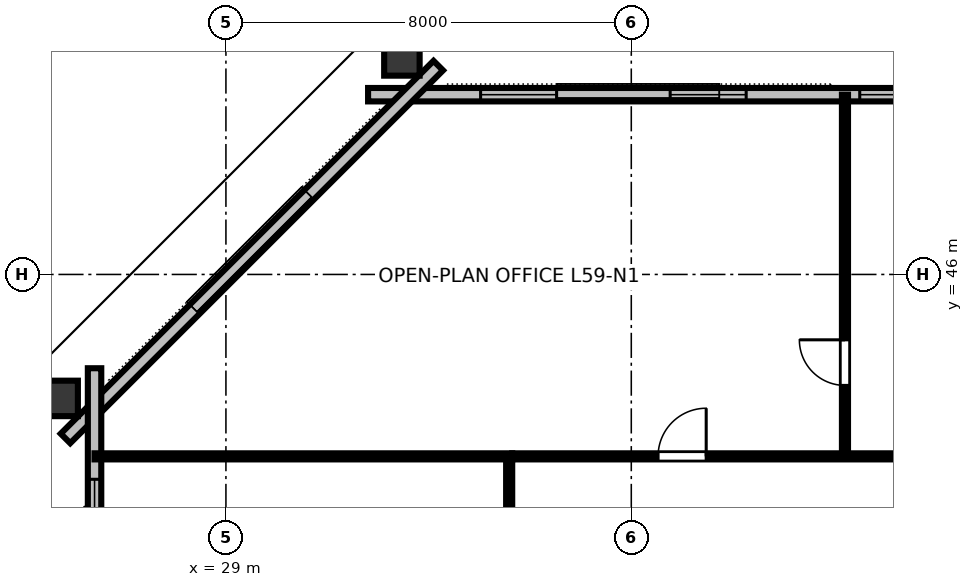
"""IFC4 building model, lengths in metres.
Left out: names, types, materials, properties, quantities, classifications, styles, units other than length and angle.
Written with IfcOpenShell. Run it as: python <this file> out.ifc"""

import sys

from ifc_helpers import new_model, si_unit, direction, frame, frame_2d, origin, origin_2d, place, context, subcontext, project, spatial, rectangle, hollow_rectangle, extrude, element, fill, save


model = new_model("IFC4")
c1 = context("Model", 3, precision=1e-05, world=origin(), true_north=direction((0.0, 1.0)))
c2 = subcontext(c1, "Body", "Model", "MODEL_VIEW")
j1 = project(units=[si_unit("LENGTHUNIT", "METRE"), si_unit("PLANEANGLEUNIT", "RADIAN")], contexts=[c1])
p1 = place(None, origin())
s1 = spatial("IfcSite", under=j1, at=p1, CompositionType="ELEMENT")
p2 = place(p1, origin())
s2 = spatial("IfcBuilding", under=s1, at=p2, CompositionType="ELEMENT")
p3 = place(p2, frame((0.0, 0.0, 223.8)))
s3 = spatial("IfcBuildingStorey", under=s2, at=p3, CompositionType="ELEMENT", Elevation=223.8)
for number, where, z_axis, x_axis in (
    (1, (32.473, 50.348, 0.0), (0.0, 0.0, 1.0), (1.0, 0.0, 0.0)),
    (2, (25.653, 43.554, 0.0), (0.0, 0.0, 1.0), (0.0, 1.0, 0.0)),
):
    element("IfcColumn", number, at=place(p3, frame(where, z_axis=z_axis, x_axis=x_axis)), inside=s3, PredefinedType="COLUMN", context=c2, shape_type="SweptSolid", body=[
        extrude(hollow_rectangle(XDim=0.7, YDim=0.85, WallThickness=0.04, at=origin_2d()), origin(), (0.0, 0.0, 1.0), 3.373),
    ])
p4 = place(p3, frame((60.195, 49.547, 0.0), z_axis=(0.0, 0.0, 1.0), x_axis=(-1.0, 0.0, 0.0)))
e3 = element("IfcWall", 3, at=p4, inside=s3, PredefinedType="STANDARD", context=c2, shape_type="SweptSolid", body=[
    extrude(rectangle(XDim=28.389, YDim=0.265, at=frame_2d((14.195, 0.0))), origin(), (0.0, 0.0, 1.0), 3.375),
])
p5 = place(p4, frame((2.221, 0.0, 0.85)))
e4 = element("IfcOpeningElement", 4, at=p5, cuts=e3, PredefinedType="OPENING", context=c2, shape_type="SweptSolid", body=[
    extrude(rectangle(XDim=1.5, YDim=1.85, at=frame_2d((0.75, 0.925))), frame((0.0, 0.142, 0.0), z_axis=(0.0, -1.0, 0.0), x_axis=(1.0, 0.0, 0.0)), (0.0, 0.0, 1.0), 0.285),
])
p6 = place(p4, frame((5.962, 0.0, 0.85)))
e5 = element("IfcOpeningElement", 5, at=p6, cuts=e3, PredefinedType="OPENING", context=c2, shape_type="SweptSolid", body=[
    extrude(rectangle(XDim=1.5, YDim=1.85, at=frame_2d((0.75, 0.925))), frame((0.0, 0.142, 0.0), z_axis=(0.0, -1.0, 0.0), x_axis=(1.0, 0.0, 0.0)), (0.0, 0.0, 1.0), 0.285),
])
p7 = place(p4, frame((9.703, 0.0, 0.85)))
e6 = element("IfcOpeningElement", 6, at=p7, cuts=e3, PredefinedType="OPENING", context=c2, shape_type="SweptSolid", body=[
    extrude(rectangle(XDim=1.5, YDim=1.85, at=frame_2d((0.75, 0.925))), frame((0.0, 0.142, 0.0), z_axis=(0.0, -1.0, 0.0), x_axis=(1.0, 0.0, 0.0)), (0.0, 0.0, 1.0), 0.285),
])
p8 = place(p4, frame((17.186, 0.0, 0.85)))
e7 = element("IfcOpeningElement", 7, at=p8, cuts=e3, PredefinedType="OPENING", context=c2, shape_type="SweptSolid", body=[
    extrude(rectangle(XDim=1.5, YDim=1.85, at=frame_2d((0.75, 0.925))), frame((0.0, 0.142, 0.0), z_axis=(0.0, -1.0, 0.0), x_axis=(1.0, 0.0, 0.0)), (0.0, 0.0, 1.0), 0.285),
])
p9 = place(p4, frame((20.927, 0.0, 0.85)))
e8 = element("IfcOpeningElement", 8, at=p9, cuts=e3, PredefinedType="OPENING", context=c2, shape_type="SweptSolid", body=[
    extrude(rectangle(XDim=1.5, YDim=1.85, at=frame_2d((0.75, 0.925))), frame((0.0, 0.142, 0.0), z_axis=(0.0, -1.0, 0.0), x_axis=(1.0, 0.0, 0.0)), (0.0, 0.0, 1.0), 0.285),
])
p10 = place(p4, frame((24.668, 0.0, 0.85)))
e9 = element("IfcOpeningElement", 9, at=p10, cuts=e3, PredefinedType="OPENING", context=c2, shape_type="SweptSolid", body=[
    extrude(rectangle(XDim=1.5, YDim=1.85, at=frame_2d((0.75, 0.925))), frame((0.0, 0.142, 0.0), z_axis=(0.0, -1.0, 0.0), x_axis=(1.0, 0.0, 0.0)), (0.0, 0.0, 1.0), 0.285),
])
p11 = place(p3, frame((33.191, 50.121, 0.0), z_axis=(0.0, 0.0, 1.0), x_axis=(-0.707106781187, -0.707106781187, 0.0)))
e10 = element("IfcWall", 10, at=p11, inside=s3, PredefinedType="STANDARD", context=c2, shape_type="SweptSolid", body=[
    extrude(rectangle(XDim=10.405, YDim=0.265, at=frame_2d((5.203, 0.0))), origin(), (0.0, 0.0, 1.0), 3.375),
])
p12 = place(p3, frame((26.407, 44.149, 0.0), z_axis=(0.0, 0.0, 1.0), x_axis=(0.0, -1.0, 0.0)))
e11 = element("IfcWall", 11, at=p12, inside=s3, PredefinedType="STANDARD", context=c2, shape_type="SweptSolid", body=[
    extrude(rectangle(XDim=24.298, YDim=0.265, at=frame_2d((12.149, 0.0))), origin(), (0.0, 0.0, 1.0), 3.375),
])
p13 = place(p12, frame((8.469, 0.0, 0.0)))
e12 = element("IfcOpeningElement", 12, at=p13, cuts=e11, PredefinedType="OPENING", context=c2, shape_type="SweptSolid", body=[
    extrude(rectangle(XDim=1.4, YDim=2.15, at=frame_2d((0.7, 1.075))), frame((0.0, 0.142, 0.0), z_axis=(0.0, -1.0, 0.0), x_axis=(1.0, 0.0, 0.0)), (0.0, 0.0, 1.0), 0.285),
])
p14 = place(p12, frame((2.191, 0.0, 0.85)))
e13 = element("IfcOpeningElement", 13, at=p14, cuts=e11, PredefinedType="OPENING", context=c2, shape_type="SweptSolid", body=[
    extrude(rectangle(XDim=1.5, YDim=1.85, at=frame_2d((0.75, 0.925))), frame((0.0, 0.142, 0.0), z_axis=(0.0, -1.0, 0.0), x_axis=(1.0, 0.0, 0.0)), (0.0, 0.0, 1.0), 0.285),
])
p15 = place(p12, frame((5.875, 0.0, 0.85)))
e14 = element("IfcOpeningElement", 14, at=p15, cuts=e11, PredefinedType="OPENING", context=c2, shape_type="SweptSolid", body=[
    extrude(rectangle(XDim=1.5, YDim=1.85, at=frame_2d((0.75, 0.925))), frame((0.0, 0.142, 0.0), z_axis=(0.0, -1.0, 0.0), x_axis=(1.0, 0.0, 0.0)), (0.0, 0.0, 1.0), 0.285),
])
p16 = place(p12, frame((13.24, 0.0, 0.85)))
e15 = element("IfcOpeningElement", 15, at=p16, cuts=e11, PredefinedType="OPENING", context=c2, shape_type="SweptSolid", body=[
    extrude(rectangle(XDim=1.5, YDim=1.85, at=frame_2d((0.75, 0.925))), frame((0.0, 0.142, 0.0), z_axis=(0.0, -1.0, 0.0), x_axis=(1.0, 0.0, 0.0)), (0.0, 0.0, 1.0), 0.285),
])
p17 = place(p12, frame((16.924, 0.0, 0.85)))
e16 = element("IfcOpeningElement", 16, at=p17, cuts=e11, PredefinedType="OPENING", context=c2, shape_type="SweptSolid", body=[
    extrude(rectangle(XDim=1.5, YDim=1.85, at=frame_2d((0.75, 0.925))), frame((0.0, 0.142, 0.0), z_axis=(0.0, -1.0, 0.0), x_axis=(1.0, 0.0, 0.0)), (0.0, 0.0, 1.0), 0.285),
])
p18 = place(p12, frame((20.607, 0.0, 0.85)))
e17 = element("IfcOpeningElement", 17, at=p18, cuts=e11, PredefinedType="OPENING", context=c2, shape_type="SweptSolid", body=[
    extrude(rectangle(XDim=1.5, YDim=1.85, at=frame_2d((0.75, 0.925))), frame((0.0, 0.142, 0.0), z_axis=(0.0, -1.0, 0.0), x_axis=(1.0, 0.0, 0.0)), (0.0, 0.0, 1.0), 0.285),
])
p19 = place(p3, frame((41.217, 42.41, 0.0), z_axis=(0.0, 0.0, 1.0), x_axis=(0.0, 1.0, 0.0)))
e18 = element("IfcWall", 18, at=p19, inside=s3, PredefinedType="PARTITIONING", context=c2, shape_type="SweptSolid", body=[
    extrude(rectangle(XDim=7.137, YDim=0.12, at=frame_2d((3.569, 0.0))), origin(), (0.0, 0.0, 1.0), 2.655),
])
p20 = place(p19, frame((1.4, 0.0, 0.0)))
e19 = element("IfcOpeningElement", 19, at=p20, cuts=e18, PredefinedType="OPENING", context=c2, shape_type="SweptSolid", body=[
    extrude(rectangle(XDim=0.9, YDim=2.15, at=frame_2d((0.45, 1.075))), frame((0.0, 0.07, 0.0), z_axis=(0.0, -1.0, 0.0), x_axis=(1.0, 0.0, 0.0)), (0.0, 0.0, 1.0), 0.14),
])
p21 = place(p3, frame((34.65, 42.41, 0.0), z_axis=(0.0, 0.0, 1.0), x_axis=(1.0, 0.0, 0.0)))
e20 = element("IfcWall", 20, at=p21, inside=s3, PredefinedType="PARTITIONING", context=c2, shape_type="SweptSolid", body=[
    extrude(rectangle(XDim=10.33, YDim=0.12, at=frame_2d((5.165, 0.0))), origin(), (0.0, 0.0, 1.0), 2.655),
])
p22 = place(p21, frame((2.878, 0.0, 0.0)))
e21 = element("IfcOpeningElement", 21, at=p22, cuts=e20, PredefinedType="OPENING", context=c2, shape_type="SweptSolid", body=[
    extrude(rectangle(XDim=0.95, YDim=2.15, at=frame_2d((0.475, 1.075))), frame((0.0, 0.07, 0.0), z_axis=(0.0, -1.0, 0.0), x_axis=(1.0, 0.0, 0.0)), (0.0, 0.0, 1.0), 0.14),
])
p23 = place(p21, frame((7.974, 0.0, 0.0)))
e22 = element("IfcOpeningElement", 22, at=p23, cuts=e20, PredefinedType="OPENING", context=c2, shape_type="SweptSolid", body=[
    extrude(rectangle(XDim=0.95, YDim=2.15, at=frame_2d((0.475, 1.075))), frame((0.0, 0.07, 0.0), z_axis=(0.0, -1.0, 0.0), x_axis=(1.0, 0.0, 0.0)), (0.0, 0.0, 1.0), 0.14),
])
p24 = place(p3, frame((34.59, 21.65, 0.0), z_axis=(0.0, 0.0, 1.0), x_axis=(0.0, 1.0, 0.0)))
e23 = element("IfcWall", 23, at=p24, inside=s3, PredefinedType="PARTITIONING", context=c2, shape_type="SweptSolid", body=[
    extrude(rectangle(XDim=20.7, YDim=0.12, at=frame_2d((10.35, 0.0))), origin(), (0.0, 0.0, 1.0), 2.655),
])
p25 = place(p24, frame((5.449, 0.0, 0.0)))
e24 = element("IfcOpeningElement", 24, at=p25, cuts=e23, PredefinedType="OPENING", context=c2, shape_type="SweptSolid", body=[
    extrude(rectangle(XDim=0.95, YDim=2.15, at=frame_2d((0.475, 1.075))), frame((0.0, 0.07, 0.0), z_axis=(0.0, -1.0, 0.0), x_axis=(1.0, 0.0, 0.0)), (0.0, 0.0, 1.0), 0.14),
])
p26 = place(p24, frame((15.599, 0.0, 0.0)))
e25 = element("IfcOpeningElement", 25, at=p26, cuts=e23, PredefinedType="OPENING", context=c2, shape_type="SweptSolid", body=[
    extrude(rectangle(XDim=0.95, YDim=2.15, at=frame_2d((0.475, 1.075))), frame((0.0, 0.07, 0.0), z_axis=(0.0, -1.0, 0.0), x_axis=(1.0, 0.0, 0.0)), (0.0, 0.0, 1.0), 0.14),
])
p27 = place(p3, frame((34.65, 42.41, 0.0), z_axis=(0.0, 0.0, 1.0), x_axis=(-1.0, 0.0, 0.0)))
e26 = element("IfcWall", 26, at=p27, inside=s3, PredefinedType="PARTITIONING", context=c2, shape_type="SweptSolid", body=[
    extrude(rectangle(XDim=8.243, YDim=0.12, at=frame_2d((4.121, 0.0))), origin(), (0.0, 0.0, 1.0), 2.655),
])
p28 = place(p8, origin())
e27 = element("IfcWindow", 27, at=p28, inside=s3, PartitioningType="SINGLE_PANEL", PredefinedType="WINDOW", context=c2, shape_type="SweptSolid", body=[
    extrude(rectangle(XDim=1.5, YDim=1.85, at=frame_2d((0.75, 0.925))), frame((0.0, 0.03, 0.0), z_axis=(0.0, -1.0, 0.0), x_axis=(1.0, 0.0, 0.0)), (0.0, 0.0, 1.0), 0.06),
])
fill(e7, e27)
p29 = place(p9, origin())
e28 = element("IfcWindow", 28, at=p29, inside=s3, PartitioningType="SINGLE_PANEL", PredefinedType="WINDOW", context=c2, shape_type="SweptSolid", body=[
    extrude(rectangle(XDim=1.5, YDim=1.85, at=frame_2d((0.75, 0.925))), frame((0.0, 0.03, 0.0), z_axis=(0.0, -1.0, 0.0), x_axis=(1.0, 0.0, 0.0)), (0.0, 0.0, 1.0), 0.06),
])
fill(e8, e28)
p30 = place(p10, origin())
e29 = element("IfcWindow", 29, at=p30, inside=s3, PartitioningType="SINGLE_PANEL", PredefinedType="WINDOW", context=c2, shape_type="SweptSolid", body=[
    extrude(rectangle(XDim=1.5, YDim=1.85, at=frame_2d((0.75, 0.925))), frame((0.0, 0.03, 0.0), z_axis=(0.0, -1.0, 0.0), x_axis=(1.0, 0.0, 0.0)), (0.0, 0.0, 1.0), 0.06),
])
fill(e9, e29)
p31 = place(p14, origin())
e30 = element("IfcWindow", 30, at=p31, inside=s3, PartitioningType="SINGLE_PANEL", PredefinedType="WINDOW", context=c2, shape_type="SweptSolid", body=[
    extrude(rectangle(XDim=1.5, YDim=1.85, at=frame_2d((0.75, 0.925))), frame((0.0, 0.03, 0.0), z_axis=(0.0, -1.0, 0.0), x_axis=(1.0, 0.0, 0.0)), (0.0, 0.0, 1.0), 0.06),
])
fill(e13, e30)
p32 = place(p20, origin())
e31 = element("IfcDoor", 31, at=p32, inside=s3, OperationType="SINGLE_SWING_RIGHT", PredefinedType="DOOR", context=c2, shape_type="SweptSolid", body=[
    extrude(rectangle(XDim=0.9, YDim=2.15, at=frame_2d((0.45, 1.075))), frame((0.0, 0.025, 0.0), z_axis=(0.0, -1.0, 0.0), x_axis=(1.0, 0.0, 0.0)), (0.0, 0.0, 1.0), 0.05),
])
fill(e19, e31)
p33 = place(p22, origin())
e32 = element("IfcDoor", 32, at=p33, inside=s3, OperationType="SINGLE_SWING_RIGHT", PredefinedType="DOOR", context=c2, shape_type="SweptSolid", body=[
    extrude(rectangle(XDim=0.95, YDim=2.15, at=frame_2d((0.475, 1.075))), frame((0.0, 0.025, 0.0), z_axis=(0.0, -1.0, 0.0), x_axis=(1.0, 0.0, 0.0)), (0.0, 0.0, 1.0), 0.05),
])
fill(e21, e32)
save(model, sys.argv[1])
